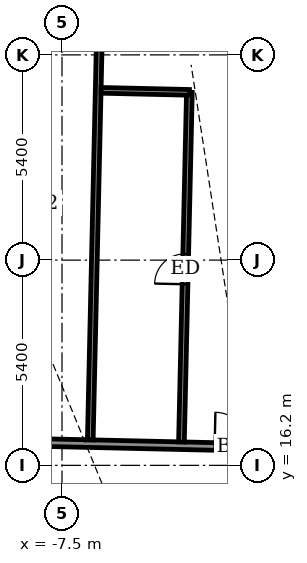
"""IFC4 building model, lengths in metres.
Left out: names, types, materials, properties, quantities, classifications, styles, units other than length and angle.
Written with IfcOpenShell. Run it as: python <this file> out.ifc"""

import sys

from ifc_helpers import new_model, si_unit, direction, frame, frame_2d, origin, place, context, subcontext, project, spatial, rectangle, extrude, element, fill, save


model = new_model("IFC4")
c1 = context("Model", 3, precision=1e-05, world=origin(), true_north=direction((0.0, 1.0)))
c2 = subcontext(c1, "Body", "Model", "MODEL_VIEW")
j1 = project(units=[si_unit("LENGTHUNIT", "METRE"), si_unit("PLANEANGLEUNIT", "RADIAN")], contexts=[c1])
p1 = place(None, origin())
s1 = spatial("IfcSite", under=j1, at=p1, CompositionType="ELEMENT")
p2 = place(p1, origin())
s2 = spatial("IfcBuilding", under=s1, at=p2, CompositionType="ELEMENT")
p3 = place(p2, frame((0.0, 0.0, 301.5)))
s3 = spatial("IfcBuildingStorey", under=s2, at=p3, CompositionType="ELEMENT", Elevation=301.5)
p4 = place(p3, frame((-26.362, 17.216, 0.0), z_axis=(0.0, 0.0, 1.0), x_axis=(0.999742445627, -0.022694545867, 0.0)))
e1 = element("IfcWall", 1, at=p4, inside=s3, PredefinedType="PARTITIONING", context=c2, shape_type="SweptSolid", body=[
    extrude(rectangle(XDim=54.509, YDim=0.2, at=frame_2d((27.255, 0.0))), origin(), (0.0, 0.0, 1.0), 2.1),
])
p5 = place(p4, frame((50.584, 0.0, 0.0)))
e2 = element("IfcOpeningElement", 2, at=p5, cuts=e1, PredefinedType="OPENING", context=c2, shape_type="SweptSolid", body=[
    extrude(rectangle(XDim=1.0, YDim=2.1, at=frame_2d((0.5, 1.05))), frame((0.0, 0.11, 0.0), z_axis=(0.0, -1.0, 0.0), x_axis=(1.0, 0.0, 0.0)), (0.0, 0.0, 1.0), 0.22),
])
p6 = place(p4, frame((44.509, 0.0, 0.0)))
e3 = element("IfcOpeningElement", 3, at=p6, cuts=e1, PredefinedType="OPENING", context=c2, shape_type="SweptSolid", body=[
    extrude(rectangle(XDim=0.9, YDim=2.1, at=frame_2d((0.45, 1.05))), frame((0.0, 0.11, 0.0), z_axis=(0.0, -1.0, 0.0), x_axis=(1.0, 0.0, 0.0)), (0.0, 0.0, 1.0), 0.22),
])
p7 = place(p4, frame((38.734, 0.0, 0.0)))
e4 = element("IfcOpeningElement", 4, at=p7, cuts=e1, PredefinedType="OPENING", context=c2, shape_type="SweptSolid", body=[
    extrude(rectangle(XDim=1.0, YDim=2.1, at=frame_2d((0.5, 1.05))), frame((0.0, 0.11, 0.0), z_axis=(0.0, -1.0, 0.0), x_axis=(1.0, 0.0, 0.0)), (0.0, 0.0, 1.0), 0.22),
])
p8 = place(p4, frame((33.034, 0.0, 0.0)))
e5 = element("IfcOpeningElement", 5, at=p8, cuts=e1, PredefinedType="OPENING", context=c2, shape_type="SweptSolid", body=[
    extrude(rectangle(XDim=0.9, YDim=2.1, at=frame_2d((0.45, 1.05))), frame((0.0, 0.11, 0.0), z_axis=(0.0, -1.0, 0.0), x_axis=(1.0, 0.0, 0.0)), (0.0, 0.0, 1.0), 0.22),
])
p9 = place(p4, frame((25.559, 0.0, 0.0)))
e6 = element("IfcOpeningElement", 6, at=p9, cuts=e1, PredefinedType="OPENING", context=c2, shape_type="SweptSolid", body=[
    extrude(rectangle(XDim=0.9, YDim=2.1, at=frame_2d((0.45, 1.05))), frame((0.0, 0.11, 0.0), z_axis=(0.0, -1.0, 0.0), x_axis=(1.0, 0.0, 0.0)), (0.0, 0.0, 1.0), 0.22),
])
p10 = place(p4, frame((22.884, 0.0, 0.0)))
e7 = element("IfcOpeningElement", 7, at=p10, cuts=e1, PredefinedType="OPENING", context=c2, shape_type="SweptSolid", body=[
    extrude(rectangle(XDim=0.9, YDim=2.1, at=frame_2d((0.45, 1.05))), frame((0.0, 0.11, 0.0), z_axis=(0.0, -1.0, 0.0), x_axis=(1.0, 0.0, 0.0)), (0.0, 0.0, 1.0), 0.22),
])
p11 = place(p4, frame((16.009, 0.0, 0.0)))
e8 = element("IfcOpeningElement", 8, at=p11, cuts=e1, PredefinedType="OPENING", context=c2, shape_type="SweptSolid", body=[
    extrude(rectangle(XDim=1.0, YDim=2.1, at=frame_2d((0.5, 1.05))), frame((0.0, 0.11, 0.0), z_axis=(0.0, -1.0, 0.0), x_axis=(1.0, 0.0, 0.0)), (0.0, 0.0, 1.0), 0.22),
])
p12 = place(p4, frame((10.184, 0.0, 0.0)))
e9 = element("IfcOpeningElement", 9, at=p12, cuts=e1, PredefinedType="OPENING", context=c2, shape_type="SweptSolid", body=[
    extrude(rectangle(XDim=1.0, YDim=2.1, at=frame_2d((0.5, 1.05))), frame((0.0, 0.11, 0.0), z_axis=(0.0, -1.0, 0.0), x_axis=(1.0, 0.0, 0.0)), (0.0, 0.0, 1.0), 0.22),
])
p13 = place(p4, frame((6.309, 0.0, 0.0)))
e10 = element("IfcOpeningElement", 10, at=p13, cuts=e1, PredefinedType="OPENING", context=c2, shape_type="SweptSolid", body=[
    extrude(rectangle(XDim=0.9, YDim=2.1, at=frame_2d((0.45, 1.05))), frame((0.0, 0.11, 0.0), z_axis=(0.0, -1.0, 0.0), x_axis=(1.0, 0.0, 0.0)), (0.0, 0.0, 1.0), 0.22),
])
p14 = place(p4, frame((0.2, 0.0, 0.0)))
e11 = element("IfcOpeningElement", 11, at=p14, cuts=e1, PredefinedType="OPENING", context=c2, shape_type="SweptSolid", body=[
    extrude(rectangle(XDim=1.0, YDim=2.1, at=frame_2d((0.5, 1.05))), frame((0.0, 0.11, 0.0), z_axis=(0.0, -1.0, 0.0), x_axis=(1.0, 0.0, 0.0)), (0.0, 0.0, 1.0), 0.22),
])
p15 = place(p4, frame((3.909, 0.0, 0.0)))
e12 = element("IfcOpeningElement", 12, at=p15, cuts=e1, PredefinedType="OPENING", context=c2, shape_type="SweptSolid", body=[
    extrude(rectangle(XDim=0.9, YDim=2.1, at=frame_2d((0.45, 1.05))), frame((0.0, 0.11, 0.0), z_axis=(0.0, -1.0, 0.0), x_axis=(1.0, 0.0, 0.0)), (0.0, 0.0, 1.0), 0.22),
])
p16 = place(p3, frame((-6.756, 16.871, 0.0), z_axis=(0.0, 0.0, 1.0), x_axis=(0.022661475803, 0.999743195783, 0.0)))
e13 = element("IfcWall", 13, at=p16, inside=s3, PredefinedType="PARTITIONING", context=c2, shape_type="SweptSolid", body=[
    extrude(rectangle(XDim=12.4, YDim=0.15, at=frame_2d((6.2, 0.0))), origin(), (0.0, 0.0, 1.0), 2.25),
])
p17 = place(p3, frame((-4.357, 16.816, 0.0), z_axis=(0.0, 0.0, 1.0), x_axis=(0.02271477479, 0.999741986218, 0.0)))
e14 = element("IfcWall", 14, at=p17, inside=s3, PredefinedType="PARTITIONING", context=c2, shape_type="SweptSolid", body=[
    extrude(rectangle(XDim=9.2, YDim=0.15, at=frame_2d((4.6, 0.0))), origin(), (0.0, 0.0, 1.0), 2.45),
])
p18 = place(p17, frame((4.15, 0.0, 0.0)))
e15 = element("IfcOpeningElement", 15, at=p18, cuts=e14, PredefinedType="OPENING", context=c2, shape_type="SweptSolid", body=[
    extrude(rectangle(XDim=0.8, YDim=2.1, at=frame_2d((0.4, 1.05))), frame((0.0, 0.085, 0.0), z_axis=(0.0, -1.0, 0.0), x_axis=(1.0, 0.0, 0.0)), (0.0, 0.0, 1.0), 0.17),
])
p19 = place(p3, frame((-6.472, 26.067, 0.0), z_axis=(0.0, 0.0, 1.0), x_axis=(0.999740260747, -0.02279059109, 0.0)))
e16 = element("IfcWall", 16, at=p19, inside=s3, PredefinedType="PARTITIONING", context=c2, shape_type="SweptSolid", body=[
    extrude(rectangle(XDim=2.324, YDim=0.15, at=frame_2d((1.162, 0.0))), origin(), (0.0, 0.0, 1.0), 2.45),
])
p20 = place(p10, origin())
e17 = element("IfcDoor", 17, at=p20, inside=s3, OperationType="SINGLE_SWING_RIGHT", PredefinedType="DOOR", context=c2, shape_type="SweptSolid", body=[
    extrude(rectangle(XDim=0.9, YDim=2.1, at=frame_2d((0.45, 1.05))), frame((0.0, 0.025, 0.0), z_axis=(0.0, -1.0, 0.0), x_axis=(1.0, 0.0, 0.0)), (0.0, 0.0, 1.0), 0.05),
])
fill(e7, e17)
p21 = place(p18, origin())
e18 = element("IfcDoor", 18, at=p21, inside=s3, OperationType="SINGLE_SWING_RIGHT", PredefinedType="DOOR", context=c2, shape_type="SweptSolid", body=[
    extrude(rectangle(XDim=0.8, YDim=2.1, at=frame_2d((0.4, 1.05))), frame((0.0, 0.025, 0.0), z_axis=(0.0, -1.0, 0.0), x_axis=(1.0, 0.0, 0.0)), (0.0, 0.0, 1.0), 0.05),
])
fill(e15, e18)
save(model, sys.argv[1])
